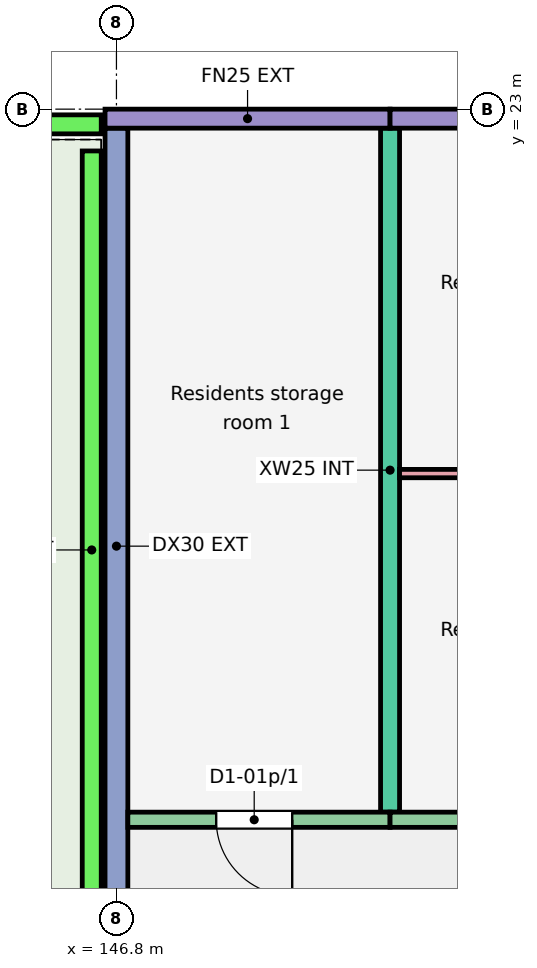
"""IFC4 building model, lengths in metres.
Left out: names, types, materials, properties, quantities, classifications, styles, units other than length and angle.
Written with IfcOpenShell. Run it as: python <this file> out.ifc"""

import sys

from ifc_helpers import new_model, si_unit, direction, frame, frame_2d, origin, place, context, subcontext, project, spatial, rectangle, extrude, element, fill, save


model = new_model("IFC4")
c1 = context("Model", 3, precision=1e-05, world=origin(), true_north=direction((0.0, 1.0)))
c2 = subcontext(c1, "Body", "Model", "MODEL_VIEW")
j1 = project(units=[si_unit("LENGTHUNIT", "METRE"), si_unit("PLANEANGLEUNIT", "RADIAN")], contexts=[c1])
p1 = place(None, origin())
s1 = spatial("IfcSite", under=j1, at=p1, CompositionType="ELEMENT")
p2 = place(p1, origin())
s2 = spatial("IfcBuilding", under=s1, at=p2, CompositionType="ELEMENT")
p3 = place(p2, frame((0.0, 0.0, 3.0)))
s3 = spatial("IfcBuildingStorey", under=s2, at=p3, CompositionType="ELEMENT", Elevation=3.0)
p4 = place(p3, frame((146.8, 11.75, 0.0), z_axis=(0.0, 0.0, 1.0), x_axis=(0.0, 1.0, 0.0)))
e1 = element("IfcWall", 1, at=p4, inside=s3, PredefinedType="SHEAR", context=c2, shape_type="SweptSolid", body=[
    extrude(rectangle(XDim=11.0, YDim=0.3, at=frame_2d((5.5, 0.0))), origin(), (0.0, 0.0, 1.0), 3.0),
])
p5 = place(p3, frame((150.4, 13.75, 0.0), z_axis=(0.0, 0.0, 1.0), x_axis=(0.0, 1.0, 0.0)))
e2 = element("IfcWall", 2, at=p5, inside=s3, PredefinedType="SHEAR", context=c2, shape_type="SweptSolid", body=[
    extrude(rectangle(XDim=9.0, YDim=0.25, at=frame_2d((4.5, 0.0))), origin(), (0.0, 0.0, 1.0), 3.0),
])
p6 = place(p3, frame((146.65, 22.875, 0.0), z_axis=(0.0, 0.0, 1.0), x_axis=(1.0, 0.0, 0.0)))
e3 = element("IfcWall", 3, at=p6, inside=s3, PredefinedType="SOLIDWALL", context=c2, shape_type="SweptSolid", body=[
    extrude(rectangle(XDim=3.75, YDim=0.25, at=frame_2d((1.875, 0.0))), origin(), (0.0, 0.0, 1.0), 3.0),
])
p7 = place(p3, frame((146.95, 13.65, 0.0), z_axis=(0.0, 0.0, 1.0), x_axis=(1.0, 0.0, 0.0)))
e4 = element("IfcWall", 4, at=p7, inside=s3, PredefinedType="SOLIDWALL", context=c2, shape_type="SweptSolid", body=[
    extrude(rectangle(XDim=3.45, YDim=0.2, at=frame_2d((1.725, 0.0))), origin(), (0.0, 0.0, 1.0), 3.0),
])
p8 = place(p7, frame((1.163, 0.0, 0.0)))
e5 = element("IfcOpeningElement", 5, at=p8, cuts=e4, PredefinedType="OPENING", context=c2, shape_type="SweptSolid", body=[
    extrude(rectangle(XDim=1.0, YDim=2.1, at=frame_2d((0.5, 1.05))), frame((0.0, 0.11, 0.0), z_axis=(0.0, -1.0, 0.0), x_axis=(1.0, 0.0, 0.0)), (0.0, 0.0, 1.0), 0.22),
])
p9 = place(p3, frame((150.4, 22.875, 0.0), z_axis=(0.0, 0.0, 1.0), x_axis=(1.0, 0.0, 0.0)))
e6 = element("IfcWall", 6, at=p9, inside=s3, PredefinedType="SOLIDWALL", context=c2, shape_type="SweptSolid", body=[
    extrude(rectangle(XDim=3.6, YDim=0.25, at=frame_2d((1.8, 0.0))), origin(), (0.0, 0.0, 1.0), 3.0),
])
p10 = place(p3, frame((150.4, 13.65, 0.0), z_axis=(0.0, 0.0, 1.0), x_axis=(1.0, 0.0, 0.0)))
e7 = element("IfcWall", 7, at=p10, inside=s3, PredefinedType="SOLIDWALL", context=c2, shape_type="SweptSolid", body=[
    extrude(rectangle(XDim=3.6, YDim=0.2, at=frame_2d((1.8, 0.0))), origin(), (0.0, 0.0, 1.0), 3.0),
])
p11 = place(p10, frame((1.3, 0.0, 0.0)))
e8 = element("IfcOpeningElement", 8, at=p11, cuts=e7, PredefinedType="OPENING", context=c2, shape_type="SweptSolid", body=[
    extrude(rectangle(XDim=1.0, YDim=2.1, at=frame_2d((0.5, 1.05))), frame((0.0, 0.11, 0.0), z_axis=(0.0, -1.0, 0.0), x_axis=(1.0, 0.0, 0.0)), (0.0, 0.0, 1.0), 0.22),
])
p12 = place(p3, frame((132.8, 22.8, 0.0), z_axis=(0.0, 0.0, 1.0), x_axis=(1.0, 0.0, 0.0)))
e9 = element("IfcWall", 9, at=p12, inside=s3, PredefinedType="PARAPET", context=c2, shape_type="SweptSolid", body=[
    extrude(rectangle(XDim=13.8, YDim=0.25, at=frame_2d((6.9, 0.0))), origin(), (0.0, 0.0, 1.0), 1.1),
])
p13 = place(p3, frame((146.475, 11.95, 0.0), z_axis=(0.0, 0.0, 1.0), x_axis=(0.0, 1.0, 0.0)))
e10 = element("IfcWall", 10, at=p13, inside=s3, PredefinedType="PARAPET", context=c2, shape_type="SweptSolid", body=[
    extrude(rectangle(XDim=10.5, YDim=0.25, at=frame_2d((5.25, 0.0))), origin(), (0.0, 0.0, 1.0), 1.1),
])
p14 = place(p3, frame((150.525, 18.205, 0.0), z_axis=(0.0, 0.0, 1.0), x_axis=(1.0, 0.0, 0.0)))
e11 = element("IfcWall", 11, at=p14, inside=s3, PredefinedType="PARTITIONING", context=c2, shape_type="SweptSolid", body=[
    extrude(rectangle(XDim=3.35, YDim=0.11, at=frame_2d((1.675, 0.0))), origin(), (0.0, 0.0, 1.0), 2.8),
])
p15 = place(p14, frame((1.225, 0.0, 0.0)))
e12 = element("IfcOpeningElement", 12, at=p15, cuts=e11, PredefinedType="OPENING", context=c2, shape_type="SweptSolid", body=[
    extrude(rectangle(XDim=0.9, YDim=2.1, at=frame_2d((0.45, 1.05))), frame((0.0, 0.065, 0.0), z_axis=(0.0, -1.0, 0.0), x_axis=(1.0, 0.0, 0.0)), (0.0, 0.0, 1.0), 0.13),
])
p16 = place(p8, origin())
e13 = element("IfcDoor", 13, at=p16, inside=s3, OperationType="SINGLE_SWING_RIGHT", PredefinedType="DOOR", context=c2, shape_type="SweptSolid", body=[
    extrude(rectangle(XDim=1.0, YDim=2.1, at=frame_2d((0.5, 1.05))), frame((0.0, 0.025, 0.0), z_axis=(0.0, -1.0, 0.0), x_axis=(1.0, 0.0, 0.0)), (0.0, 0.0, 1.0), 0.05),
])
fill(e5, e13)
save(model, sys.argv[1])
